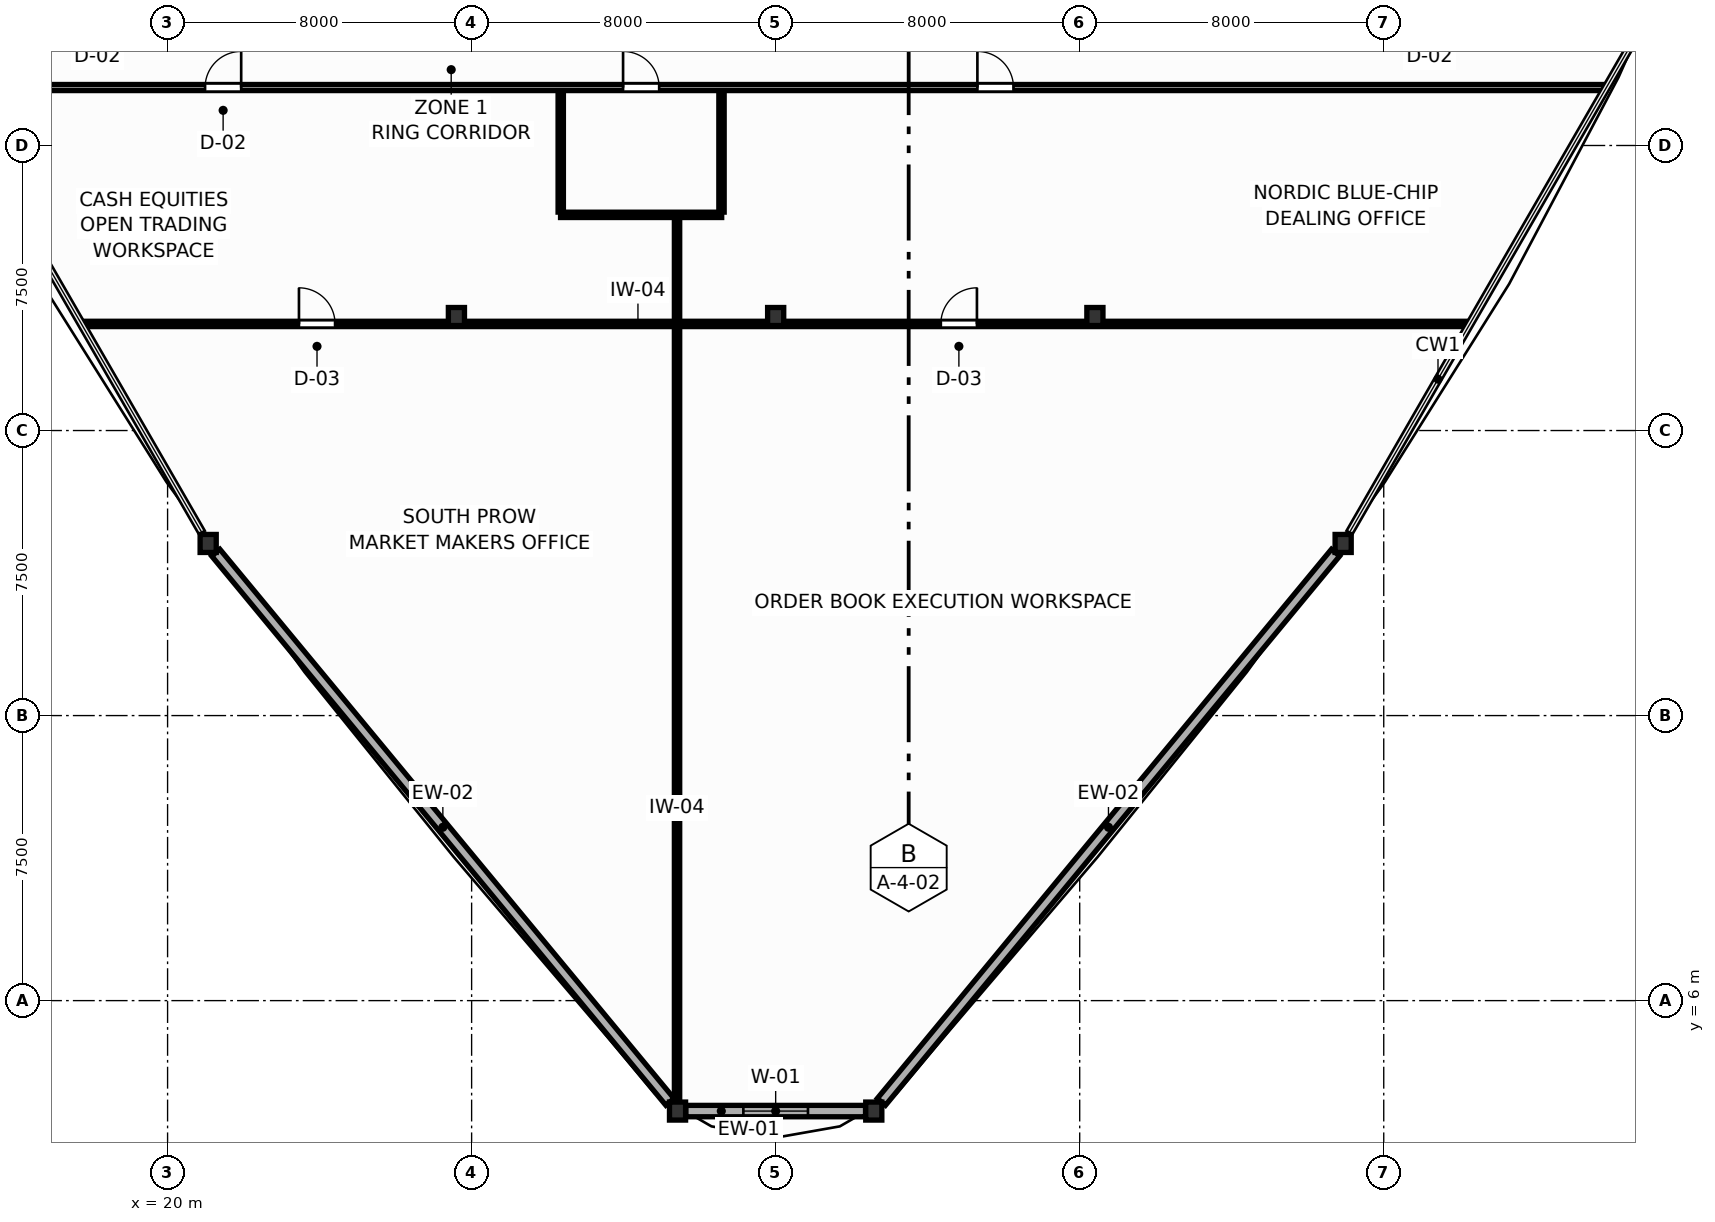
"""IFC4 building model, lengths in metres.
Left out: names, types, materials, properties, quantities, classifications, styles, units other than length and angle.
Written with IfcOpenShell. Run it as: python <this file> out.ifc"""

import sys

from ifc_helpers import new_model, si_unit, direction, frame, frame_2d, origin, origin_2d, place, context, subcontext, project, spatial, rectangle, i_section, extrude, source, transform, mapped, element, fill, save


model = new_model("IFC4")
c1 = context("Model", 3, precision=1e-05, world=origin(), true_north=direction((0.0, 1.0)))
c2 = subcontext(c1, "Body", "Model", "MODEL_VIEW")
j1 = project(units=[si_unit("LENGTHUNIT", "METRE"), si_unit("PLANEANGLEUNIT", "RADIAN")], contexts=[c1])
p1 = place(None, origin())
s1 = spatial("IfcSite", under=j1, at=p1, CompositionType="ELEMENT")
p2 = place(p1, origin())
s2 = spatial("IfcBuilding", under=s1, at=p2, CompositionType="ELEMENT")
p3 = place(p2, frame((0.0, 0.0, 24.0)))
s3 = spatial("IfcBuildingStorey", under=s2, at=p3, CompositionType="ELEMENT", Elevation=24.0)
m1 = source(origin(), c2, "Body", "SweptSolid", [
    extrude(i_section(OverallWidth=0.424, OverallDepth=0.474, WebThickness=0.045, FlangeThickness=0.072, FilletRadius=0.015, at=origin_2d()), origin(), (0.0, 0.0, 1.0), 3.9),
])
for number, where, z_axis, x_axis in (
    (1, (27.6, 24.0, 0.0), (0.0, 0.0, 1.0), (1.0, 0.0, 0.0)),
    (2, (44.4, 24.0, 0.0), (0.0, 0.0, 1.0), (1.0, 0.0, 0.0)),
    (3, (36.0, 24.0, 0.0), (0.0, 0.0, 1.0), (1.0, 0.0, 0.0)),
    (4, (21.068, 18.029, 0.0), (0.0, 0.0, 1.0), (1.0, 0.0, 0.0)),
    (5, (33.418, 3.094, 0.0), (0.0, 0.0, 1.0), (1.0, 0.0, 0.0)),
    (6, (38.582, 3.094, 0.0), (0.0, 0.0, 1.0), (1.0, 0.0, 0.0)),
    (7, (50.932, 18.029, 0.0), (0.0, 0.0, 1.0), (1.0, 0.0, 0.0)),
):
    element("IfcColumn", number, at=place(p3, frame(where, z_axis=z_axis, x_axis=x_axis)), inside=s3, PredefinedType="COLUMN", context=c2, shape_type="MappedRepresentation", body=[
        mapped(m1, transform((0.0, 0.0, 0.0), scale=1.0)),
    ])
p4 = place(p3, frame((21.268, 17.787, 0.0), z_axis=(0.0, 0.0, 1.0), x_axis=(0.637262575447, -0.770646747826, 0.0)))
e8 = element("IfcWall", 8, at=p4, inside=s3, PredefinedType="SOLIDWALL", context=c2, shape_type="SweptSolid", body=[
    extrude(rectangle(XDim=18.752, YDim=0.28, at=frame_2d((9.376, 0.0))), origin(), (0.0, 0.0, 1.0), 3.23),
])
p5 = place(p3, frame((33.635, 3.094, 0.0), z_axis=(0.0, 0.0, 1.0), x_axis=(1.0, 0.0, 0.0)))
e9 = element("IfcWall", 9, at=p5, inside=s3, PredefinedType="SOLIDWALL", context=c2, shape_type="SweptSolid", body=[
    extrude(rectangle(XDim=4.73, YDim=0.3, at=frame_2d((2.365, 0.0))), origin(), (0.0, 0.0, 1.0), 3.23),
])
p6 = place(p5, frame((1.515, 0.0, 0.75)))
e10 = element("IfcOpeningElement", 10, at=p6, cuts=e9, PredefinedType="OPENING", context=c2, shape_type="SweptSolid", body=[
    extrude(rectangle(XDim=1.7, YDim=1.75, at=frame_2d((0.85, 0.875))), frame((0.0, 0.16, 0.0), z_axis=(0.0, -1.0, 0.0), x_axis=(1.0, 0.0, 0.0)), (0.0, 0.0, 1.0), 0.32),
])
p7 = place(p3, frame((38.782, 3.336, 0.0), z_axis=(0.0, 0.0, 1.0), x_axis=(0.637262575447, 0.770646747826, 0.0)))
e11 = element("IfcWall", 11, at=p7, inside=s3, PredefinedType="SOLIDWALL", context=c2, shape_type="SweptSolid", body=[
    extrude(rectangle(XDim=18.752, YDim=0.28, at=frame_2d((9.376, 0.0))), origin(), (0.0, 0.0, 1.0), 3.23),
])
p8 = place(p3, frame((14.162, 30.025, 0.0), z_axis=(0.0, 0.0, 1.0), x_axis=(1.0, 0.0, 0.0)))
e12 = element("IfcWall", 12, at=p8, inside=s3, PredefinedType="PARTITIONING", context=c2, shape_type="SweptSolid", body=[
    extrude(rectangle(XDim=43.676, YDim=0.16, at=frame_2d((21.838, 0.0))), origin(), (0.0, 0.0, 1.0), 3.68),
])
p9 = place(p8, frame((17.823, 0.0, 0.0)))
e13 = element("IfcOpeningElement", 13, at=p9, cuts=e12, PredefinedType="OPENING", context=c2, shape_type="SweptSolid", body=[
    extrude(rectangle(XDim=0.95, YDim=2.05, at=frame_2d((0.475, 1.025))), frame((0.0, 0.09, 0.0), z_axis=(0.0, -1.0, 0.0), x_axis=(1.0, 0.0, 0.0)), (0.0, 0.0, 1.0), 0.18),
])
p10 = place(p8, frame((6.824, 0.0, 0.0)))
e14 = element("IfcOpeningElement", 14, at=p10, cuts=e12, PredefinedType="OPENING", context=c2, shape_type="SweptSolid", body=[
    extrude(rectangle(XDim=0.95, YDim=2.05, at=frame_2d((0.475, 1.025))), frame((0.0, 0.09, 0.0), z_axis=(0.0, -1.0, 0.0), x_axis=(1.0, 0.0, 0.0)), (0.0, 0.0, 1.0), 0.18),
])
p11 = place(p8, frame((27.146, 0.0, 0.0)))
e15 = element("IfcOpeningElement", 15, at=p11, cuts=e12, PredefinedType="OPENING", context=c2, shape_type="SweptSolid", body=[
    extrude(rectangle(XDim=0.95, YDim=2.05, at=frame_2d((0.475, 1.025))), frame((0.0, 0.09, 0.0), z_axis=(0.0, -1.0, 0.0), x_axis=(1.0, 0.0, 0.0)), (0.0, 0.0, 1.0), 0.18),
])
p12 = place(p3, frame((17.753, 23.805, 0.0), z_axis=(0.0, 0.0, 1.0), x_axis=(1.0, 0.0, 0.0)))
e16 = element("IfcWall", 16, at=p12, inside=s3, PredefinedType="PARTITIONING", context=c2, shape_type="SweptSolid", body=[
    extrude(rectangle(XDim=36.494, YDim=0.14, at=frame_2d((18.247, 0.0))), origin(), (0.0, 0.0, 1.0), 3.18),
])
p13 = place(p12, frame((5.704, 0.0, 0.0)))
e17 = element("IfcOpeningElement", 17, at=p13, cuts=e16, PredefinedType="OPENING", context=c2, shape_type="SweptSolid", body=[
    extrude(rectangle(XDim=0.95, YDim=2.05, at=frame_2d((0.475, 1.025))), frame((0.0, 0.08, 0.0), z_axis=(0.0, -1.0, 0.0), x_axis=(1.0, 0.0, 0.0)), (0.0, 0.0, 1.0), 0.16),
])
p14 = place(p12, frame((22.593, 0.0, 0.0)))
e18 = element("IfcOpeningElement", 18, at=p14, cuts=e16, PredefinedType="OPENING", context=c2, shape_type="SweptSolid", body=[
    extrude(rectangle(XDim=0.95, YDim=2.05, at=frame_2d((0.475, 1.025))), frame((0.0, 0.08, 0.0), z_axis=(0.0, -1.0, 0.0), x_axis=(1.0, 0.0, 0.0)), (0.0, 0.0, 1.0), 0.16),
])
p15 = place(p3, frame((33.405, 3.129, 0.0), z_axis=(0.0, 0.0, 1.0), x_axis=(0.0, 1.0, 0.0)))
e19 = element("IfcWall", 19, at=p15, inside=s3, PredefinedType="PARTITIONING", context=c2, shape_type="SweptSolid", body=[
    extrude(rectangle(XDim=23.561, YDim=0.14, at=frame_2d((11.78, 0.0))), origin(), (0.0, 0.0, 1.0), 3.18),
])
p16 = place(p3, frame((30.34, 26.675, 0.0), z_axis=(0.0, 0.0, 1.0), x_axis=(1.0, 0.0, 0.0)))
e20 = element("IfcWall", 20, at=p16, inside=s3, PredefinedType="PARTITIONING", context=c2, shape_type="SweptSolid", body=[
    extrude(rectangle(XDim=4.24, YDim=0.14, at=frame_2d((2.12, 0.0))), origin(), (0.0, 0.0, 1.0), 3.68),
])
for number, where, z_axis, x_axis in (
    (21, (30.345, 26.747, 0.0), (0.0, 0.0, 1.0), (0.0, 1.0, 0.0)),
    (22, (34.575, 26.747, 0.0), (0.0, 0.0, 1.0), (0.0, 1.0, 0.0)),
):
    element("IfcWall", number, at=place(p3, frame(where, z_axis=z_axis, x_axis=x_axis)), inside=s3, PredefinedType="PARTITIONING", context=c2, shape_type="SweptSolid", body=[
        extrude(rectangle(XDim=3.196, YDim=0.14, at=frame_2d((1.598, 0.0))), origin(), (0.0, 0.0, 1.0), 3.68),
    ])
p17 = place(p6, origin())
e23 = element("IfcWindow", 23, at=p17, inside=s3, PartitioningType="SINGLE_PANEL", PredefinedType="WINDOW", context=c2, shape_type="SweptSolid", body=[
    extrude(rectangle(XDim=1.7, YDim=1.75, at=frame_2d((0.85, 0.875))), frame((0.0, 0.03, 0.0), z_axis=(0.0, -1.0, 0.0), x_axis=(1.0, 0.0, 0.0)), (0.0, 0.0, 1.0), 0.06),
])
fill(e10, e23)
p18 = place(p9, origin())
e24 = element("IfcDoor", 24, at=p18, inside=s3, OperationType="SINGLE_SWING_LEFT", PredefinedType="DOOR", context=c2, shape_type="SweptSolid", body=[
    extrude(rectangle(XDim=0.95, YDim=2.05, at=frame_2d((0.475, 1.025))), frame((0.0, 0.025, 0.0), z_axis=(0.0, -1.0, 0.0), x_axis=(1.0, 0.0, 0.0)), (0.0, 0.0, 1.0), 0.05),
])
fill(e13, e24)
p19 = place(p10, origin())
e25 = element("IfcDoor", 25, at=p19, inside=s3, OperationType="SINGLE_SWING_RIGHT", PredefinedType="DOOR", context=c2, shape_type="SweptSolid", body=[
    extrude(rectangle(XDim=0.95, YDim=2.05, at=frame_2d((0.475, 1.025))), frame((0.0, 0.025, 0.0), z_axis=(0.0, -1.0, 0.0), x_axis=(1.0, 0.0, 0.0)), (0.0, 0.0, 1.0), 0.05),
])
fill(e14, e25)
p20 = place(p11, origin())
e26 = element("IfcDoor", 26, at=p20, inside=s3, OperationType="SINGLE_SWING_LEFT", PredefinedType="DOOR", context=c2, shape_type="SweptSolid", body=[
    extrude(rectangle(XDim=0.95, YDim=2.05, at=frame_2d((0.475, 1.025))), frame((0.0, 0.025, 0.0), z_axis=(0.0, -1.0, 0.0), x_axis=(1.0, 0.0, 0.0)), (0.0, 0.0, 1.0), 0.05),
])
fill(e15, e26)
p21 = place(p13, origin())
e27 = element("IfcDoor", 27, at=p21, inside=s3, OperationType="SINGLE_SWING_LEFT", PredefinedType="DOOR", context=c2, shape_type="SweptSolid", body=[
    extrude(rectangle(XDim=0.95, YDim=2.05, at=frame_2d((0.475, 1.025))), frame((0.0, 0.025, 0.0), z_axis=(0.0, -1.0, 0.0), x_axis=(1.0, 0.0, 0.0)), (0.0, 0.0, 1.0), 0.05),
])
fill(e17, e27)
p22 = place(p14, origin())
e28 = element("IfcDoor", 28, at=p22, inside=s3, OperationType="SINGLE_SWING_RIGHT", PredefinedType="DOOR", context=c2, shape_type="SweptSolid", body=[
    extrude(rectangle(XDim=0.95, YDim=2.05, at=frame_2d((0.475, 1.025))), frame((0.0, 0.025, 0.0), z_axis=(0.0, -1.0, 0.0), x_axis=(1.0, 0.0, 0.0)), (0.0, 0.0, 1.0), 0.05),
])
fill(e18, e28)
save(model, sys.argv[1])
